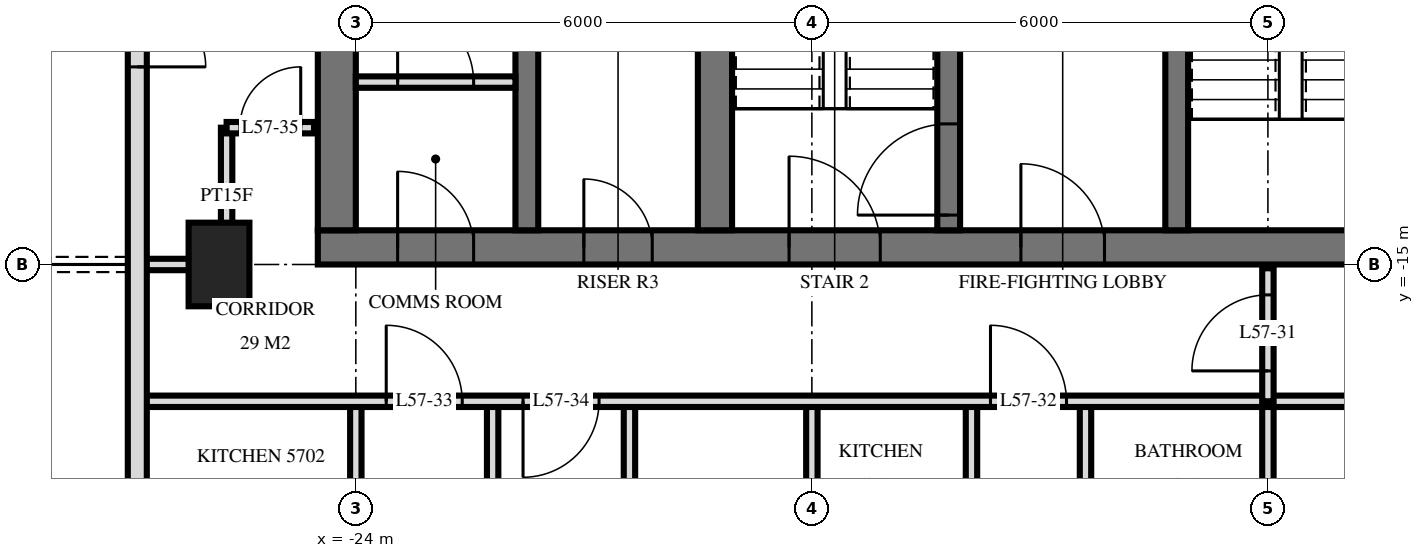
"""IFC4 building model, lengths in metres.
Left out: names, types, materials, properties, quantities, classifications, styles, units other than length and angle.
Written with IfcOpenShell. Run it as: python <this file> out.ifc"""

import sys

from ifc_helpers import new_model, si_unit, direction, frame, frame_2d, origin, origin_2d, place, context, subcontext, project, spatial, rectangle, extrude, element, fill, save


model = new_model("IFC4")
c1 = context("Model", 3, precision=1e-05, world=origin(), true_north=direction((0.0, 1.0)))
c2 = subcontext(c1, "Body", "Model", "MODEL_VIEW")
j1 = project(units=[si_unit("LENGTHUNIT", "METRE"), si_unit("PLANEANGLEUNIT", "RADIAN")], contexts=[c1])
p1 = place(None, origin())
s1 = spatial("IfcSite", under=j1, at=p1, CompositionType="ELEMENT")
p2 = place(p1, origin())
s2 = spatial("IfcBuilding", under=s1, at=p2, CompositionType="ELEMENT")
p3 = place(p2, frame((0.0, 0.0, 218.6)))
s3 = spatial("IfcBuildingStorey", under=s2, at=p3, CompositionType="ELEMENT", Elevation=218.6)
p4 = place(p3, frame((-25.8, -15.0, 0.0), z_axis=(0.0, 0.0, 1.0), x_axis=(0.0, 1.0, 0.0)))
e1 = element("IfcColumn", 1, at=p4, inside=s3, PredefinedType="COLUMN", context=c2, shape_type="SweptSolid", body=[
    extrude(rectangle(XDim=1.1, YDim=0.8, at=origin_2d()), origin(), (0.0, 0.0, 1.0), 3.5),
])
p5 = place(p3, frame((-24.5, -14.775, 0.0), z_axis=(0.0, 0.0, 1.0), x_axis=(1.0, 0.0, 0.0)))
e2 = element("IfcWall", 2, at=p5, inside=s3, PredefinedType="SHEAR", context=c2, shape_type="SweptSolid", body=[
    extrude(rectangle(XDim=14.5, YDim=0.45, at=frame_2d((7.25, 0.0))), origin(), (0.0, 0.0, 1.0), 3.5),
])
p6 = place(p5, frame((6.2, 0.0, 0.0)))
e3 = element("IfcOpeningElement", 3, at=p6, cuts=e2, PredefinedType="OPENING", context=c2, shape_type="SweptSolid", body=[
    extrude(rectangle(XDim=1.2, YDim=2.1, at=frame_2d((0.6, 1.05))), frame((0.0, 0.235, 0.0), z_axis=(0.0, -1.0, 0.0), x_axis=(1.0, 0.0, 0.0)), (0.0, 0.0, 1.0), 0.47),
])
p7 = place(p5, frame((9.25, 0.0, 0.0)))
e4 = element("IfcOpeningElement", 4, at=p7, cuts=e2, PredefinedType="OPENING", context=c2, shape_type="SweptSolid", body=[
    extrude(rectangle(XDim=1.1, YDim=2.1, at=frame_2d((0.55, 1.05))), frame((0.0, 0.235, 0.0), z_axis=(0.0, -1.0, 0.0), x_axis=(1.0, 0.0, 0.0)), (0.0, 0.0, 1.0), 0.47),
])
p8 = place(p5, frame((3.5, 0.0, 0.0)))
e5 = element("IfcOpeningElement", 5, at=p8, cuts=e2, PredefinedType="OPENING", context=c2, shape_type="SweptSolid", body=[
    extrude(rectangle(XDim=0.9, YDim=2.1, at=frame_2d((0.45, 1.05))), frame((0.0, 0.235, 0.0), z_axis=(0.0, -1.0, 0.0), x_axis=(1.0, 0.0, 0.0)), (0.0, 0.0, 1.0), 0.47),
])
p9 = place(p5, frame((1.05, 0.0, 0.0)))
e6 = element("IfcOpeningElement", 6, at=p9, cuts=e2, PredefinedType="OPENING", context=c2, shape_type="SweptSolid", body=[
    extrude(rectangle(XDim=1.0, YDim=2.1, at=frame_2d((0.5, 1.05))), frame((0.0, 0.235, 0.0), z_axis=(0.0, -1.0, 0.0), x_axis=(1.0, 0.0, 0.0)), (0.0, 0.0, 1.0), 0.47),
])
p10 = place(p3, frame((-24.25, -14.55, 0.0), z_axis=(0.0, 0.0, 1.0), x_axis=(0.0, 1.0, 0.0)))
e7 = element("IfcWall", 7, at=p10, inside=s3, PredefinedType="SHEAR", context=c2, shape_type="SweptSolid", body=[
    extrude(rectangle(XDim=14.1, YDim=0.5, at=frame_2d((7.05, 0.0))), origin(), (0.0, 0.0, 1.0), 3.5),
])
p11 = place(p3, frame((-13.2, -14.55, 0.0), z_axis=(0.0, 0.0, 1.0), x_axis=(0.0, 1.0, 0.0)))
e8 = element("IfcWall", 8, at=p11, inside=s3, PredefinedType="SHEAR", context=c2, shape_type="SweptSolid", body=[
    extrude(rectangle(XDim=5.4, YDim=0.3, at=frame_2d((2.7, 0.0))), origin(), (0.0, 0.0, 1.0), 3.5),
])
p12 = place(p11, frame((4.0, 0.0, 0.0)))
e9 = element("IfcOpeningElement", 9, at=p12, cuts=e8, PredefinedType="OPENING", context=c2, shape_type="SweptSolid", body=[
    extrude(rectangle(XDim=1.2, YDim=2.1, at=frame_2d((0.6, 1.05))), frame((0.0, 0.16, 0.0), z_axis=(0.0, -1.0, 0.0), x_axis=(1.0, 0.0, 0.0)), (0.0, 0.0, 1.0), 0.32),
])
p13 = place(p3, frame((-16.2, -14.55, 0.0), z_axis=(0.0, 0.0, 1.0), x_axis=(0.0, 1.0, 0.0)))
e10 = element("IfcWall", 10, at=p13, inside=s3, PredefinedType="SHEAR", context=c2, shape_type="SweptSolid", body=[
    extrude(rectangle(XDim=5.4, YDim=0.3, at=frame_2d((2.7, 0.0))), origin(), (0.0, 0.0, 1.0), 3.5),
])
p14 = place(p13, frame((0.2, 0.0, 0.0)))
e11 = element("IfcOpeningElement", 11, at=p14, cuts=e10, PredefinedType="OPENING", context=c2, shape_type="SweptSolid", body=[
    extrude(rectangle(XDim=1.2, YDim=2.1, at=frame_2d((0.6, 1.05))), frame((0.0, 0.16, 0.0), z_axis=(0.0, -1.0, 0.0), x_axis=(1.0, 0.0, 0.0)), (0.0, 0.0, 1.0), 0.32),
])
p15 = place(p3, frame((-19.275, -14.55, 0.0), z_axis=(0.0, 0.0, 1.0), x_axis=(0.0, 1.0, 0.0)))
e12 = element("IfcWall", 12, at=p15, inside=s3, PredefinedType="SHEAR", context=c2, shape_type="SweptSolid", body=[
    extrude(rectangle(XDim=5.4, YDim=0.45, at=frame_2d((2.7, 0.0))), origin(), (0.0, 0.0, 1.0), 3.5),
])
p16 = place(p3, frame((-21.75, -14.55, 0.0), z_axis=(0.0, 0.0, 1.0), x_axis=(0.0, 1.0, 0.0)))
e13 = element("IfcWall", 13, at=p16, inside=s3, PredefinedType="SHEAR", context=c2, shape_type="SweptSolid", body=[
    extrude(rectangle(XDim=5.4, YDim=0.3, at=frame_2d((2.7, 0.0))), origin(), (0.0, 0.0, 1.0), 3.5),
])
p17 = place(p3, frame((-26.875, -3.325, 0.0), z_axis=(0.0, 0.0, 1.0), x_axis=(0.0, -1.0, 0.0)))
e14 = element("IfcWall", 14, at=p17, inside=s3, PredefinedType="SOLIDWALL", context=c2, shape_type="SweptSolid", body=[
    extrude(rectangle(XDim=21.551, YDim=0.25, at=frame_2d((10.775, 0.0))), origin(), (0.0, 0.0, 1.0), 3.22),
])
p18 = place(p17, frame((7.275, 0.0, 0.0)))
e15 = element("IfcOpeningElement", 15, at=p18, cuts=e14, PredefinedType="OPENING", context=c2, shape_type="SweptSolid", body=[
    extrude(rectangle(XDim=1.8, YDim=2.4, at=frame_2d((0.9, 1.2))), frame((0.0, 0.135, 0.0), z_axis=(0.0, -1.0, 0.0), x_axis=(1.0, 0.0, 0.0)), (0.0, 0.0, 1.0), 0.27),
])
p19 = place(p17, frame((15.275, 0.0, 0.0)))
e16 = element("IfcOpeningElement", 16, at=p19, cuts=e14, PredefinedType="OPENING", context=c2, shape_type="SweptSolid", body=[
    extrude(rectangle(XDim=1.8, YDim=2.4, at=frame_2d((0.9, 1.2))), frame((0.0, 0.135, 0.0), z_axis=(0.0, -1.0, 0.0), x_axis=(1.0, 0.0, 0.0)), (0.0, 0.0, 1.0), 0.27),
])
p20 = place(p17, frame((18.875, 0.0, 0.0)))
e17 = element("IfcOpeningElement", 17, at=p20, cuts=e14, PredefinedType="OPENING", context=c2, shape_type="SweptSolid", body=[
    extrude(rectangle(XDim=1.8, YDim=2.4, at=frame_2d((0.9, 1.2))), frame((0.0, 0.135, 0.0), z_axis=(0.0, -1.0, 0.0), x_axis=(1.0, 0.0, 0.0)), (0.0, 0.0, 1.0), 0.27),
])
p21 = place(p3, frame((-24.0, -12.6, 0.0), z_axis=(0.0, 0.0, 1.0), x_axis=(1.0, 0.0, 0.0)))
e18 = element("IfcWall", 18, at=p21, inside=s3, PredefinedType="PARTITIONING", context=c2, shape_type="SweptSolid", body=[
    extrude(rectangle(XDim=2.1, YDim=0.15, at=frame_2d((1.05, 0.0))), origin(), (0.0, 0.0, 1.0), 3.2),
])
p22 = place(p21, frame((0.55, 0.0, 0.0)))
e19 = element("IfcOpeningElement", 19, at=p22, cuts=e18, PredefinedType="OPENING", context=c2, shape_type="SweptSolid", body=[
    extrude(rectangle(XDim=1.0, YDim=2.1, at=frame_2d((0.5, 1.05))), frame((0.0, 0.085, 0.0), z_axis=(0.0, -1.0, 0.0), x_axis=(1.0, 0.0, 0.0)), (0.0, 0.0, 1.0), 0.17),
])
p23 = place(p3, frame((-12.0, -16.8, 0.0), z_axis=(0.0, 0.0, 1.0), x_axis=(0.0, 1.0, 0.0)))
e20 = element("IfcWall", 20, at=p23, inside=s3, PredefinedType="PARTITIONING", context=c2, shape_type="SweptSolid", body=[
    extrude(rectangle(XDim=1.75, YDim=0.15, at=frame_2d((0.875, 0.0))), origin(), (0.0, 0.0, 1.0), 3.22),
])
p24 = place(p23, frame((0.4, 0.0, 0.0)))
e21 = element("IfcOpeningElement", 21, at=p24, cuts=e20, PredefinedType="OPENING", context=c2, shape_type="SweptSolid", body=[
    extrude(rectangle(XDim=1.0, YDim=2.1, at=frame_2d((0.5, 1.05))), frame((0.0, 0.085, 0.0), z_axis=(0.0, -1.0, 0.0), x_axis=(1.0, 0.0, 0.0)), (0.0, 0.0, 1.0), 0.17),
])
p25 = place(p3, frame((-12.0, -29.22, 0.0), z_axis=(0.0, 0.0, 1.0), x_axis=(0.0, 1.0, 0.0)))
e22 = element("IfcWall", 22, at=p25, inside=s3, PredefinedType="PARTITIONING", context=c2, shape_type="SweptSolid", body=[
    extrude(rectangle(XDim=12.42, YDim=0.15, at=frame_2d((6.21, 0.0))), origin(), (0.0, 0.0, 1.0), 3.22),
])
p26 = place(p3, frame((-14.4, -21.0, 0.0), z_axis=(0.0, 0.0, 1.0), x_axis=(0.0, 1.0, 0.0)))
e23 = element("IfcWall", 23, at=p26, inside=s3, PredefinedType="PARTITIONING", context=c2, shape_type="SweptSolid", body=[
    extrude(rectangle(XDim=4.2, YDim=0.15, at=frame_2d((2.1, 0.0))), origin(), (0.0, 0.0, 1.0), 3.22),
])
p27 = place(p26, frame((1.6, 0.0, 0.0)))
e24 = element("IfcOpeningElement", 24, at=p27, cuts=e23, PredefinedType="OPENING", context=c2, shape_type="SweptSolid", body=[
    extrude(rectangle(XDim=1.0, YDim=2.1, at=frame_2d((0.5, 1.05))), frame((0.0, 0.085, 0.0), z_axis=(0.0, -1.0, 0.0), x_axis=(1.0, 0.0, 0.0)), (0.0, 0.0, 1.0), 0.17),
])
p28 = place(p3, frame((-15.9, -21.0, 0.0), z_axis=(0.0, 0.0, 1.0), x_axis=(0.0, 1.0, 0.0)))
e25 = element("IfcWall", 25, at=p28, inside=s3, PredefinedType="PARTITIONING", context=c2, shape_type="SweptSolid", body=[
    extrude(rectangle(XDim=4.2, YDim=0.15, at=frame_2d((2.1, 0.0))), origin(), (0.0, 0.0, 1.0), 3.22),
])
p29 = place(p28, frame((1.6, 0.0, 0.0)))
e26 = element("IfcOpeningElement", 26, at=p29, cuts=e25, PredefinedType="OPENING", context=c2, shape_type="SweptSolid", body=[
    extrude(rectangle(XDim=1.0, YDim=2.1, at=frame_2d((0.5, 1.05))), frame((0.0, 0.085, 0.0), z_axis=(0.0, -1.0, 0.0), x_axis=(1.0, 0.0, 0.0)), (0.0, 0.0, 1.0), 0.17),
])
p30 = place(p3, frame((-18.0, -29.22, 0.0), z_axis=(0.0, 0.0, 1.0), x_axis=(0.0, 1.0, 0.0)))
e27 = element("IfcWall", 27, at=p30, inside=s3, PredefinedType="PARTITIONING", context=c2, shape_type="SweptSolid", body=[
    extrude(rectangle(XDim=12.42, YDim=0.15, at=frame_2d((6.21, 0.0))), origin(), (0.0, 0.0, 1.0), 3.22),
])
for number, where, z_axis, x_axis in (
    (28, (-20.4, -21.0, 0.0), (0.0, 0.0, 1.0), (0.0, 1.0, 0.0)),
    (29, (-22.2, -21.0, 0.0), (0.0, 0.0, 1.0), (0.0, 1.0, 0.0)),
):
    element("IfcWall", number, at=place(p3, frame(where, z_axis=z_axis, x_axis=x_axis)), inside=s3, PredefinedType="PARTITIONING", context=c2, shape_type="SweptSolid", body=[
        extrude(rectangle(XDim=4.2, YDim=0.15, at=frame_2d((2.1, 0.0))), origin(), (0.0, 0.0, 1.0), 3.22),
    ])
p31 = place(p3, frame((-24.0, -21.0, 0.0), z_axis=(0.0, 0.0, 1.0), x_axis=(0.0, 1.0, 0.0)))
e30 = element("IfcWall", 30, at=p31, inside=s3, PredefinedType="PARTITIONING", context=c2, shape_type="SweptSolid", body=[
    extrude(rectangle(XDim=4.2, YDim=0.15, at=frame_2d((2.1, 0.0))), origin(), (0.0, 0.0, 1.0), 3.22),
])
p32 = place(p31, frame((1.58, 0.0, 0.0)))
e31 = element("IfcOpeningElement", 31, at=p32, cuts=e30, PredefinedType="OPENING", context=c2, shape_type="SweptSolid", body=[
    extrude(rectangle(XDim=1.0, YDim=2.1, at=frame_2d((0.5, 1.05))), frame((0.0, 0.085, 0.0), z_axis=(0.0, -1.0, 0.0), x_axis=(1.0, 0.0, 0.0)), (0.0, 0.0, 1.0), 0.17),
])
p33 = place(p3, frame((-25.7, -15.0, 0.0), z_axis=(0.0, 0.0, 1.0), x_axis=(0.0, 1.0, 0.0)))
e32 = element("IfcWall", 32, at=p33, inside=s3, PredefinedType="PARTITIONING", context=c2, shape_type="SweptSolid", body=[
    extrude(rectangle(XDim=1.8, YDim=0.15, at=frame_2d((0.9, 0.0))), origin(), (0.0, 0.0, 1.0), 3.22),
])
p34 = place(p3, frame((-26.82, -16.8, 0.0), z_axis=(0.0, 0.0, 1.0), x_axis=(1.0, 0.0, 0.0)))
e33 = element("IfcWall", 33, at=p34, inside=s3, PredefinedType="PARTITIONING", context=c2, shape_type="SweptSolid", body=[
    extrude(rectangle(XDim=53.64, YDim=0.15, at=frame_2d((26.82, 0.0))), origin(), (0.0, 0.0, 1.0), 3.22),
])
p35 = place(p34, frame((11.17, 0.0, 0.0)))
e34 = element("IfcOpeningElement", 34, at=p35, cuts=e33, PredefinedType="OPENING", context=c2, shape_type="SweptSolid", body=[
    extrude(rectangle(XDim=1.0, YDim=2.1, at=frame_2d((0.5, 1.05))), frame((0.0, 0.085, 0.0), z_axis=(0.0, -1.0, 0.0), x_axis=(1.0, 0.0, 0.0)), (0.0, 0.0, 1.0), 0.17),
])
p36 = place(p34, frame((3.22, 0.0, 0.0)))
e35 = element("IfcOpeningElement", 35, at=p36, cuts=e33, PredefinedType="OPENING", context=c2, shape_type="SweptSolid", body=[
    extrude(rectangle(XDim=1.0, YDim=2.1, at=frame_2d((0.5, 1.05))), frame((0.0, 0.085, 0.0), z_axis=(0.0, -1.0, 0.0), x_axis=(1.0, 0.0, 0.0)), (0.0, 0.0, 1.0), 0.17),
])
p37 = place(p34, frame((5.02, 0.0, 0.0)))
e36 = element("IfcOpeningElement", 36, at=p37, cuts=e33, PredefinedType="OPENING", context=c2, shape_type="SweptSolid", body=[
    extrude(rectangle(XDim=1.0, YDim=2.1, at=frame_2d((0.5, 1.05))), frame((0.0, 0.085, 0.0), z_axis=(0.0, -1.0, 0.0), x_axis=(1.0, 0.0, 0.0)), (0.0, 0.0, 1.0), 0.17),
])
p38 = place(p34, frame((47.72, 0.0, 0.0)))
e37 = element("IfcOpeningElement", 37, at=p38, cuts=e33, PredefinedType="OPENING", context=c2, shape_type="SweptSolid", body=[
    extrude(rectangle(XDim=1.0, YDim=2.1, at=frame_2d((0.5, 1.05))), frame((0.0, 0.085, 0.0), z_axis=(0.0, -1.0, 0.0), x_axis=(1.0, 0.0, 0.0)), (0.0, 0.0, 1.0), 0.17),
])
p39 = place(p34, frame((51.04, 0.0, 0.0)))
e38 = element("IfcOpeningElement", 38, at=p39, cuts=e33, PredefinedType="OPENING", context=c2, shape_type="SweptSolid", body=[
    extrude(rectangle(XDim=1.0, YDim=2.1, at=frame_2d((0.5, 1.05))), frame((0.0, 0.085, 0.0), z_axis=(0.0, -1.0, 0.0), x_axis=(1.0, 0.0, 0.0)), (0.0, 0.0, 1.0), 0.17),
])
p40 = place(p34, frame((17.32, 0.0, 0.0)))
e39 = element("IfcOpeningElement", 39, at=p40, cuts=e33, PredefinedType="OPENING", context=c2, shape_type="SweptSolid", body=[
    extrude(rectangle(XDim=1.0, YDim=2.1, at=frame_2d((0.5, 1.05))), frame((0.0, 0.085, 0.0), z_axis=(0.0, -1.0, 0.0), x_axis=(1.0, 0.0, 0.0)), (0.0, 0.0, 1.0), 0.17),
])
p41 = place(p34, frame((26.32, 0.0, 0.0)))
e40 = element("IfcOpeningElement", 40, at=p41, cuts=e33, PredefinedType="OPENING", context=c2, shape_type="SweptSolid", body=[
    extrude(rectangle(XDim=1.0, YDim=2.1, at=frame_2d((0.5, 1.05))), frame((0.0, 0.085, 0.0), z_axis=(0.0, -1.0, 0.0), x_axis=(1.0, 0.0, 0.0)), (0.0, 0.0, 1.0), 0.17),
])
p42 = place(p34, frame((35.32, 0.0, 0.0)))
e41 = element("IfcOpeningElement", 41, at=p42, cuts=e33, PredefinedType="OPENING", context=c2, shape_type="SweptSolid", body=[
    extrude(rectangle(XDim=1.0, YDim=2.1, at=frame_2d((0.5, 1.05))), frame((0.0, 0.085, 0.0), z_axis=(0.0, -1.0, 0.0), x_axis=(1.0, 0.0, 0.0)), (0.0, 0.0, 1.0), 0.17),
])
p43 = place(p3, frame((-26.82, -15.0, 0.0), z_axis=(0.0, 0.0, 1.0), x_axis=(1.0, 0.0, 0.0)))
e42 = element("IfcWall", 42, at=p43, inside=s3, PredefinedType="PARTITIONING", context=c2, shape_type="SweptSolid", body=[
    extrude(rectangle(XDim=1.12, YDim=0.15, at=frame_2d((0.56, 0.0))), origin(), (0.0, 0.0, 1.0), 3.22),
])
p44 = place(p3, frame((-25.7, -13.2, 0.0), z_axis=(0.0, 0.0, 1.0), x_axis=(1.0, 0.0, 0.0)))
e43 = element("IfcWall", 43, at=p44, inside=s3, PredefinedType="PARTITIONING", context=c2, shape_type="SweptSolid", body=[
    extrude(rectangle(XDim=1.15, YDim=0.15, at=frame_2d((0.575, 0.0))), origin(), (0.0, 0.0, 1.0), 3.22),
])
p45 = place(p44, frame((0.175, 0.0, 0.0)))
e44 = element("IfcOpeningElement", 44, at=p45, cuts=e43, PredefinedType="OPENING", context=c2, shape_type="SweptSolid", body=[
    extrude(rectangle(XDim=0.8, YDim=2.1, at=frame_2d((0.4, 1.05))), frame((0.0, 0.085, 0.0), z_axis=(0.0, -1.0, 0.0), x_axis=(1.0, 0.0, 0.0)), (0.0, 0.0, 1.0), 0.17),
])
p46 = place(p18, origin())
e45 = element("IfcDoor", 45, at=p46, inside=s3, OperationType="DOUBLE_DOOR_SINGLE_SWING", PredefinedType="DOOR", context=c2, shape_type="SweptSolid", body=[
    extrude(rectangle(XDim=1.8, YDim=2.4, at=frame_2d((0.9, 1.2))), frame((0.0, 0.025, 0.0), z_axis=(0.0, -1.0, 0.0), x_axis=(1.0, 0.0, 0.0)), (0.0, 0.0, 1.0), 0.05),
])
fill(e15, e45)
p47 = place(p6, origin())
e46 = element("IfcDoor", 46, at=p47, inside=s3, OperationType="SINGLE_SWING_RIGHT", PredefinedType="DOOR", context=c2, shape_type="SweptSolid", body=[
    extrude(rectangle(XDim=1.2, YDim=2.1, at=frame_2d((0.6, 1.05))), frame((0.0, 0.025, 0.0), z_axis=(0.0, -1.0, 0.0), x_axis=(1.0, 0.0, 0.0)), (0.0, 0.0, 1.0), 0.05),
])
fill(e3, e46)
p48 = place(p7, origin())
e47 = element("IfcDoor", 47, at=p48, inside=s3, OperationType="SINGLE_SWING_RIGHT", PredefinedType="DOOR", context=c2, shape_type="SweptSolid", body=[
    extrude(rectangle(XDim=1.1, YDim=2.1, at=frame_2d((0.55, 1.05))), frame((0.0, 0.025, 0.0), z_axis=(0.0, -1.0, 0.0), x_axis=(1.0, 0.0, 0.0)), (0.0, 0.0, 1.0), 0.05),
])
fill(e4, e47)
p49 = place(p8, origin())
e48 = element("IfcDoor", 48, at=p49, inside=s3, OperationType="SINGLE_SWING_RIGHT", PredefinedType="DOOR", context=c2, shape_type="SweptSolid", body=[
    extrude(rectangle(XDim=0.9, YDim=2.1, at=frame_2d((0.45, 1.05))), frame((0.0, 0.025, 0.0), z_axis=(0.0, -1.0, 0.0), x_axis=(1.0, 0.0, 0.0)), (0.0, 0.0, 1.0), 0.05),
])
fill(e5, e48)
p50 = place(p9, origin())
e49 = element("IfcDoor", 49, at=p50, inside=s3, OperationType="SINGLE_SWING_RIGHT", PredefinedType="DOOR", context=c2, shape_type="SweptSolid", body=[
    extrude(rectangle(XDim=1.0, YDim=2.1, at=frame_2d((0.5, 1.05))), frame((0.0, 0.025, 0.0), z_axis=(0.0, -1.0, 0.0), x_axis=(1.0, 0.0, 0.0)), (0.0, 0.0, 1.0), 0.05),
])
fill(e6, e49)
p51 = place(p14, origin())
e50 = element("IfcDoor", 50, at=p51, inside=s3, OperationType="SINGLE_SWING_RIGHT", PredefinedType="DOOR", context=c2, shape_type="SweptSolid", body=[
    extrude(rectangle(XDim=1.2, YDim=2.1, at=frame_2d((0.6, 1.05))), frame((0.0, 0.025, 0.0), z_axis=(0.0, -1.0, 0.0), x_axis=(1.0, 0.0, 0.0)), (0.0, 0.0, 1.0), 0.05),
])
fill(e11, e50)
p52 = place(p22, origin())
e51 = element("IfcDoor", 51, at=p52, inside=s3, OperationType="SINGLE_SWING_RIGHT", PredefinedType="DOOR", context=c2, shape_type="SweptSolid", body=[
    extrude(rectangle(XDim=1.0, YDim=2.1, at=frame_2d((0.5, 1.05))), frame((0.0, 0.025, 0.0), z_axis=(0.0, -1.0, 0.0), x_axis=(1.0, 0.0, 0.0)), (0.0, 0.0, 1.0), 0.05),
])
fill(e19, e51)
p53 = place(p24, origin())
e52 = element("IfcDoor", 52, at=p53, inside=s3, OperationType="SINGLE_SWING_RIGHT", PredefinedType="DOOR", context=c2, shape_type="SweptSolid", body=[
    extrude(rectangle(XDim=1.0, YDim=2.1, at=frame_2d((0.5, 1.05))), frame((0.0, 0.025, 0.0), z_axis=(0.0, -1.0, 0.0), x_axis=(1.0, 0.0, 0.0)), (0.0, 0.0, 1.0), 0.05),
])
fill(e21, e52)
p54 = place(p35, origin())
e53 = element("IfcDoor", 53, at=p54, inside=s3, OperationType="SINGLE_SWING_RIGHT", PredefinedType="DOOR", context=c2, shape_type="SweptSolid", body=[
    extrude(rectangle(XDim=1.0, YDim=2.1, at=frame_2d((0.5, 1.05))), frame((0.0, 0.025, 0.0), z_axis=(0.0, -1.0, 0.0), x_axis=(1.0, 0.0, 0.0)), (0.0, 0.0, 1.0), 0.05),
])
fill(e34, e53)
p55 = place(p36, origin())
e54 = element("IfcDoor", 54, at=p55, inside=s3, OperationType="SINGLE_SWING_RIGHT", PredefinedType="DOOR", context=c2, shape_type="SweptSolid", body=[
    extrude(rectangle(XDim=1.0, YDim=2.1, at=frame_2d((0.5, 1.05))), frame((0.0, 0.025, 0.0), z_axis=(0.0, -1.0, 0.0), x_axis=(1.0, 0.0, 0.0)), (0.0, 0.0, 1.0), 0.05),
])
fill(e35, e54)
p56 = place(p37, frame((0.5, 0.0, 0.0), z_axis=(0.0, 0.0, 1.0), x_axis=(-1.0, 0.0, 0.0)))
e55 = element("IfcDoor", 55, at=p56, inside=s3, OperationType="SINGLE_SWING_LEFT", PredefinedType="DOOR", context=c2, shape_type="SweptSolid", body=[
    extrude(rectangle(XDim=1.0, YDim=2.1, at=frame_2d((0.0, 1.05))), frame((0.0, -0.025, 0.0), z_axis=(0.0, 1.0, 0.0), x_axis=(-1.0, 0.0, 0.0)), (0.0, 0.0, 1.0), 0.05),
])
fill(e36, e55)
p57 = place(p45, origin())
e56 = element("IfcDoor", 56, at=p57, inside=s3, OperationType="SINGLE_SWING_LEFT", PredefinedType="DOOR", context=c2, shape_type="SweptSolid", body=[
    extrude(rectangle(XDim=0.8, YDim=2.1, at=frame_2d((0.4, 1.05))), frame((0.0, 0.025, 0.0), z_axis=(0.0, -1.0, 0.0), x_axis=(1.0, 0.0, 0.0)), (0.0, 0.0, 1.0), 0.05),
])
fill(e44, e56)
save(model, sys.argv[1])
